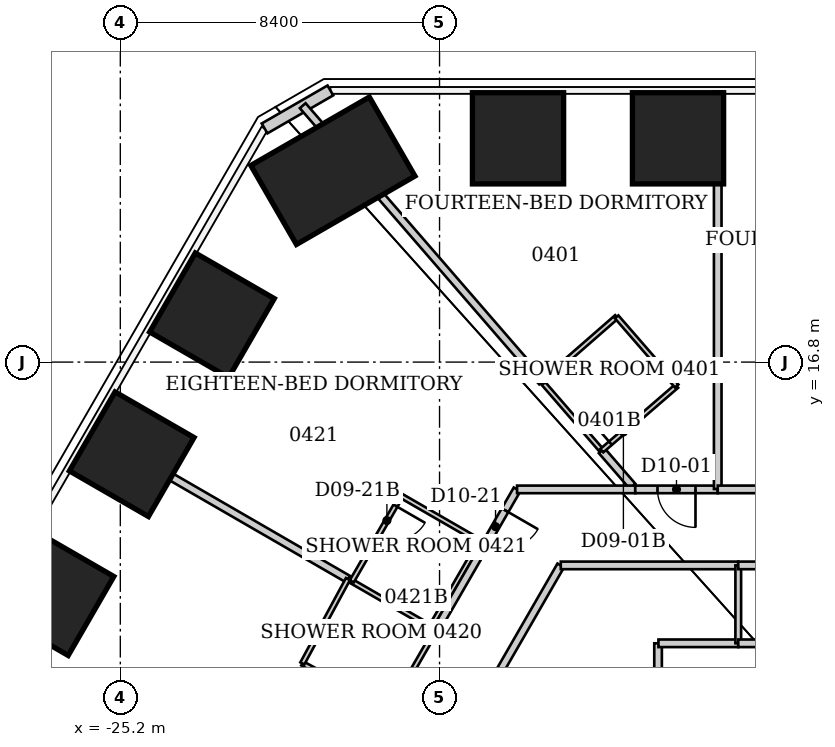
"""IFC4 building model, lengths in metres.
Left out: names, types, materials, properties, quantities, classifications, styles, units other than length and angle.
Written with IfcOpenShell. Run it as: python <this file> out.ifc"""

import sys

from ifc_helpers import new_model, si_unit, direction, frame, frame_2d, origin, origin_2d, place, context, subcontext, project, spatial, rectangle, extrude, element, fill, save


model = new_model("IFC4")
c1 = context("Model", 3, precision=1e-05, world=origin(), true_north=direction((0.0, 1.0)))
c2 = subcontext(c1, "Body", "Model", "MODEL_VIEW")
j1 = project(units=[si_unit("LENGTHUNIT", "METRE"), si_unit("PLANEANGLEUNIT", "RADIAN")], contexts=[c1])
p1 = place(None, origin())
s1 = spatial("IfcSite", under=j1, at=p1, CompositionType="ELEMENT")
p2 = place(p1, origin())
s2 = spatial("IfcBuilding", under=s1, at=p2, CompositionType="ELEMENT")
p3 = place(p2, frame((0.0, 0.0, 23.0)))
s3 = spatial("IfcBuildingStorey", under=s2, at=p3, CompositionType="ELEMENT", Elevation=23.0)
for number, where, z_axis, x_axis in (
    (1, (-14.735, 22.689, 0.0), (0.0, 0.0, 1.0), (0.0, 1.0, 0.0)),
    (2, (-10.525, 22.689, 0.0), (0.0, 0.0, 1.0), (0.0, 1.0, 0.0)),
    (3, (-27.01, 10.719, 0.0), (0.0, 0.0, 1.0), (-0.866, 0.5, 0.0)),
    (4, (-24.899, 14.375, 0.0), (0.0, 0.0, 1.0), (-0.866, 0.5, 0.0)),
    (5, (-22.788, 18.032, 0.0), (0.0, 0.0, 1.0), (-0.866, 0.5, 0.0)),
):
    element("IfcColumn", number, at=place(p3, frame(where, z_axis=z_axis, x_axis=x_axis)), inside=s3, PredefinedType="COLUMN", context=c2, shape_type="SweptSolid", body=[
        extrude(rectangle(XDim=2.4, YDim=2.4, at=origin_2d()), origin(), (0.0, 0.0, 1.0), 3.8),
    ])
p4 = place(p3, frame((-19.606, 21.835, 0.0), z_axis=(0.0, 0.0, 1.0), x_axis=(-0.5, 0.866025403784, 0.0)))
e6 = element("IfcColumn", 6, at=p4, inside=s3, PredefinedType="COLUMN", context=c2, shape_type="SweptSolid", body=[
    extrude(rectangle(XDim=2.4, YDim=3.6, at=origin_2d()), origin(), (0.0, 0.0, 1.0), 3.8),
])
p5 = place(p3, frame((-21.404, 22.949, 0.0), z_axis=(0.0, 0.0, 1.0), x_axis=(0.866010750942, 0.50002537861, 0.0)))
e7 = element("IfcWall", 7, at=p5, inside=s3, PredefinedType="SOLIDWALL", context=c2, shape_type="SweptSolid", body=[
    extrude(rectangle(XDim=2.0, YDim=0.3, at=frame_2d((1.0, 0.0))), origin(), (0.0, 0.0, 1.0), 3.64),
])
p6 = place(p3, frame((-25.886, 14.95, 0.0), z_axis=(0.0, 0.0, 1.0), x_axis=(0.865726686167, -0.50051703753, 0.0)))
e8 = element("IfcWall", 8, at=p6, inside=s3, PredefinedType="PARTITIONING", context=c2, shape_type="SweptSolid", body=[
    extrude(rectangle(XDim=7.712, YDim=0.2, at=frame_2d((3.856, 0.0))), origin(), (0.0, 0.0, 1.0), 2.86),
])
p7 = place(p3, frame((-20.41, 8.87, 0.0), z_axis=(0.0, 0.0, 1.0), x_axis=(0.879324680711, -0.476222748189, 0.0)))
e9 = element("IfcWall", 9, at=p7, inside=s3, PredefinedType="PARTITIONING", context=c2, shape_type="SweptSolid", body=[
    extrude(rectangle(XDim=2.604, YDim=0.12, at=frame_2d((1.302, 0.0))), origin(), (0.0, 0.0, 1.0), 3.64),
])
p8 = place(p7, frame((1.404, 0.0, 0.0)))
e10 = element("IfcOpeningElement", 10, at=p8, cuts=e9, PredefinedType="OPENING", context=c2, shape_type="SweptSolid", body=[
    extrude(rectangle(XDim=0.9, YDim=2.03, at=frame_2d((0.45, 1.015))), frame((0.0, 0.06, 0.0), z_axis=(0.0, -1.0, 0.0), x_axis=(1.0, 0.0, 0.0)), (0.0, 0.0, 1.0), 0.12),
])
p9 = place(p3, frame((-20.4, 23.547, 0.0), z_axis=(0.0, 0.0, 1.0), x_axis=(0.654910244559, -0.755706670323, 0.0)))
e11 = element("IfcWall", 11, at=p9, inside=s3, PredefinedType="PARTITIONING", context=c2, shape_type="SweptSolid", body=[
    extrude(rectangle(XDim=9.618, YDim=0.2, at=frame_2d((4.809, 0.0))), origin(), (0.0, 0.0, 1.0), 3.64),
])
p10 = place(p3, frame((-19.21, 11.09, 0.0), z_axis=(0.0, 0.0, 1.0), x_axis=(-0.475466449919, -0.879733854641, 0.0)))
e12 = element("IfcWall", 12, at=p10, inside=s3, PredefinedType="PARTITIONING", context=c2, shape_type="SweptSolid", body=[
    extrude(rectangle(XDim=2.524, YDim=0.12, at=frame_2d((1.262, 0.0))), origin(), (0.0, 0.0, 1.0), 3.64),
])
p11 = place(p3, frame((-19.11, 11.03, 0.0), z_axis=(0.0, 0.0, 1.0), x_axis=(0.866202511239, -0.499693115345, 0.0)))
e13 = element("IfcWall", 13, at=p11, inside=s3, PredefinedType="PARTITIONING", context=c2, shape_type="SweptSolid", body=[
    extrude(rectangle(XDim=2.401, YDim=0.12, at=frame_2d((1.201, 0.0))), origin(), (0.0, 0.0, 1.0), 2.86),
])
p12 = place(p3, frame((-18.12, 7.63, 0.0), z_axis=(0.0, 0.0, 1.0), x_axis=(0.499957770222, 0.866049783786, 0.0)))
e14 = element("IfcWall", 14, at=p12, inside=s3, PredefinedType="PARTITIONING", context=c2, shape_type="SweptSolid", body=[
    extrude(rectangle(XDim=2.455, YDim=0.12, at=frame_2d((1.228, 0.0))), origin(), (0.0, 0.0, 1.0), 3.64),
])
p13 = place(p3, frame((-17.87, 4.06, 0.0), z_axis=(0.0, 0.0, 1.0), x_axis=(0.499424260127, 0.866357552282, 0.0)))
e15 = element("IfcWall", 15, at=p13, inside=s3, PredefinedType="PARTITIONING", context=c2, shape_type="SweptSolid", body=[
    extrude(rectangle(XDim=8.53, YDim=0.2, at=frame_2d((4.265, 0.0))), origin(), (0.0, 0.0, 1.0), 3.64),
])
p14 = place(p3, frame((-17.81, 13.28, 0.0), z_axis=(0.0, 0.0, 1.0), x_axis=(-0.500291685314, -0.865856933682, 0.0)))
e16 = element("IfcWall", 16, at=p14, inside=s3, PredefinedType="PARTITIONING", context=c2, shape_type="SweptSolid", body=[
    extrude(rectangle(XDim=2.599, YDim=0.12, at=frame_2d((1.299, 0.0))), origin(), (0.0, 0.0, 1.0), 3.64),
])
p15 = place(p14, frame((0.3, 0.0, 0.0)))
e17 = element("IfcOpeningElement", 17, at=p15, cuts=e16, PredefinedType="OPENING", context=c2, shape_type="SweptSolid", body=[
    extrude(rectangle(XDim=0.9, YDim=2.03, at=frame_2d((0.45, 1.015))), frame((0.0, 0.06, 0.0), z_axis=(0.0, -1.0, 0.0), x_axis=(1.0, 0.0, 0.0)), (0.0, 0.0, 1.0), 0.12),
])
p16 = place(p3, frame((-17.03, 9.83, 0.0), z_axis=(0.0, 0.0, 1.0), x_axis=(0.880098986228, -0.47479024257, 0.0)))
e18 = element("IfcWall", 18, at=p16, inside=s3, PredefinedType="PARTITIONING", context=c2, shape_type="SweptSolid", body=[
    extrude(rectangle(XDim=0.147, YDim=0.12, at=frame_2d((0.074, 0.0))), origin(), (0.0, 0.0, 1.0), 3.64),
])
p17 = place(p3, frame((-17.03, 9.83, 0.0), z_axis=(0.0, 0.0, 1.0), x_axis=(0.500291685314, 0.865856933682, 0.0)))
e19 = element("IfcWall", 19, at=p17, inside=s3, PredefinedType="PARTITIONING", context=c2, shape_type="SweptSolid", body=[
    extrude(rectangle(XDim=2.599, YDim=0.12, at=frame_2d((1.299, 0.0))), origin(), (0.0, 0.0, 1.0), 3.64),
])
p18 = place(p3, frame((-16.892, 9.756, 0.0), z_axis=(0.0, 0.0, 1.0), x_axis=(0.499894213467, 0.866086471054, 0.0)))
e20 = element("IfcWall", 20, at=p18, inside=s3, PredefinedType="PARTITIONING", context=c2, shape_type="SweptSolid", body=[
    extrude(rectangle(XDim=4.266, YDim=0.2, at=frame_2d((2.133, 0.0))), origin(), (0.0, 0.0, 1.0), 3.64),
])
p19 = place(p18, frame((2.633, 0.0, 0.0)))
e21 = element("IfcOpeningElement", 21, at=p19, cuts=e20, PredefinedType="OPENING", context=c2, shape_type="SweptSolid", body=[
    extrude(rectangle(XDim=1.0, YDim=2.13, at=frame_2d((0.5, 1.065))), frame((0.0, 0.1, 0.0), z_axis=(0.0, -1.0, 0.0), x_axis=(1.0, 0.0, 0.0)), (0.0, 0.0, 1.0), 0.2),
])
p20 = place(p3, frame((-15.73, 12.08, 0.0), z_axis=(0.0, 0.0, 1.0), x_axis=(-0.866202511239, 0.499693115345, 0.0)))
e22 = element("IfcWall", 22, at=p20, inside=s3, PredefinedType="PARTITIONING", context=c2, shape_type="SweptSolid", body=[
    extrude(rectangle(XDim=2.401, YDim=0.12, at=frame_2d((1.201, 0.0))), origin(), (0.0, 0.0, 1.0), 3.64),
])
p21 = place(p3, frame((-14.101, 16.279, 0.0), z_axis=(0.0, 0.0, 1.0), x_axis=(0.654868469202, -0.755742871647, 0.0)))
e23 = element("IfcWall", 23, at=p21, inside=s3, PredefinedType="PARTITIONING", context=c2, shape_type="SweptSolid", body=[
    extrude(rectangle(XDim=2.396, YDim=0.12, at=frame_2d((1.198, 0.0))), origin(), (0.0, 0.0, 1.0), 3.64),
])
p22 = place(p3, frame((-13.61, 11.45, 0.0), z_axis=(0.0, 0.0, 1.0), x_axis=(1.0, 0.0, 0.0)))
e24 = element("IfcWall", 24, at=p22, inside=s3, PredefinedType="PARTITIONING", context=c2, shape_type="SweptSolid", body=[
    extrude(rectangle(XDim=4.67, YDim=0.2, at=frame_2d((2.335, 0.0))), origin(), (0.0, 0.0, 1.0), 3.64),
])
p23 = place(p3, frame((-12.532, 14.468, 0.0), z_axis=(0.0, 0.0, 1.0), x_axis=(0.654877937884, -0.755734666714, 0.0)))
e25 = element("IfcWall", 25, at=p23, inside=s3, PredefinedType="PARTITIONING", context=c2, shape_type="SweptSolid", body=[
    extrude(rectangle(XDim=1.237, YDim=0.2, at=frame_2d((0.619, 0.0))), origin(), (0.0, 0.0, 1.0), 3.64),
])
p24 = place(p3, frame((-12.53, 14.47, 0.0), z_axis=(0.0, 0.0, 1.0), x_axis=(0.757086659925, 0.653314464377, 0.0)))
e26 = element("IfcWall", 26, at=p24, inside=s3, PredefinedType="PARTITIONING", context=c2, shape_type="SweptSolid", body=[
    extrude(rectangle(XDim=2.602, YDim=0.12, at=frame_2d((1.301, 0.0))), origin(), (0.0, 0.0, 1.0), 3.64),
])
p25 = place(p24, frame((0.3, 0.0, 0.0)))
e27 = element("IfcOpeningElement", 27, at=p25, cuts=e26, PredefinedType="OPENING", context=c2, shape_type="SweptSolid", body=[
    extrude(rectangle(XDim=0.9, YDim=2.03, at=frame_2d((0.45, 1.015))), frame((0.0, 0.06, 0.0), z_axis=(0.0, -1.0, 0.0), x_axis=(1.0, 0.0, 0.0)), (0.0, 0.0, 1.0), 0.12),
])
p26 = place(p3, frame((-12.14, 17.99, 0.0), z_axis=(0.0, 0.0, 1.0), x_axis=(-0.753570046386, -0.657367617996, 0.0)))
e28 = element("IfcWall", 28, at=p26, inside=s3, PredefinedType="PARTITIONING", context=c2, shape_type="SweptSolid", body=[
    extrude(rectangle(XDim=2.601, YDim=0.12, at=frame_2d((1.301, 0.0))), origin(), (0.0, 0.0, 1.0), 3.64),
])
p27 = place(p3, frame((-11.65, 13.45, 0.0), z_axis=(0.0, 0.0, 1.0), x_axis=(-1.0, 0.0, 0.0)))
e29 = element("IfcWall", 29, at=p27, inside=s3, PredefinedType="PARTITIONING", context=c2, shape_type="SweptSolid", body=[
    extrude(rectangle(XDim=3.11, YDim=0.2, at=frame_2d((1.555, 0.0))), origin(), (0.0, 0.0, 1.0), 3.64),
])
p28 = place(p3, frame((-11.05, 9.4, 0.0), z_axis=(0.0, 0.0, 1.0), x_axis=(0.0, -1.0, 0.0)))
e30 = element("IfcWall", 30, at=p28, inside=s3, PredefinedType="PARTITIONING", context=c2, shape_type="SweptSolid", body=[
    extrude(rectangle(XDim=17.16, YDim=0.2, at=frame_2d((8.58, 0.0))), origin(), (0.0, 0.0, 1.0), 3.64),
])
p29 = place(p28, frame((8.03, 0.0, 0.0)))
e31 = element("IfcOpeningElement", 31, at=p29, cuts=e30, PredefinedType="OPENING", context=c2, shape_type="SweptSolid", body=[
    extrude(rectangle(XDim=1.1, YDim=2.2, at=frame_2d((0.55, 1.1))), frame((0.0, 0.1, 0.0), z_axis=(0.0, -1.0, 0.0), x_axis=(1.0, 0.0, 0.0)), (0.0, 0.0, 1.0), 0.2),
])
p30 = place(p3, frame((-10.56, 16.17, 0.0), z_axis=(0.0, 0.0, 1.0), x_axis=(-0.65550883331, 0.755187506155, 0.0)))
e32 = element("IfcWall", 32, at=p30, inside=s3, PredefinedType="PARTITIONING", context=c2, shape_type="SweptSolid", body=[
    extrude(rectangle(XDim=2.41, YDim=0.12, at=frame_2d((1.205, 0.0))), origin(), (0.0, 0.0, 1.0), 3.64),
])
p31 = place(p3, frame((-9.48, 13.45, 0.0), z_axis=(0.0, 0.0, 1.0), x_axis=(-1.0, 0.0, 0.0)))
e33 = element("IfcWall", 33, at=p31, inside=s3, PredefinedType="PARTITIONING", context=c2, shape_type="SweptSolid", body=[
    extrude(rectangle(XDim=2.17, YDim=0.2, at=frame_2d((1.085, 0.0))), origin(), (0.0, 0.0, 1.0), 3.64),
])
p32 = place(p31, frame((0.585, 0.0, 0.0)))
e34 = element("IfcOpeningElement", 34, at=p32, cuts=e33, PredefinedType="OPENING", context=c2, shape_type="SweptSolid", body=[
    extrude(rectangle(XDim=1.0, YDim=2.13, at=frame_2d((0.5, 1.065))), frame((0.0, 0.1, 0.0), z_axis=(0.0, -1.0, 0.0), x_axis=(1.0, 0.0, 0.0)), (0.0, 0.0, 1.0), 0.2),
])
p33 = place(p3, frame((-9.48, 23.92, 0.0), z_axis=(0.0, 0.0, 1.0), x_axis=(0.0, -1.0, 0.0)))
e35 = element("IfcWall", 35, at=p33, inside=s3, PredefinedType="PARTITIONING", context=c2, shape_type="SweptSolid", body=[
    extrude(rectangle(XDim=10.46, YDim=0.2, at=frame_2d((5.23, 0.0))), origin(), (0.0, 0.0, 1.0), 3.64),
])
p34 = place(p3, frame((-8.94, 9.4, 0.0), z_axis=(0.0, 0.0, 1.0), x_axis=(-1.0, 0.0, 0.0)))
e36 = element("IfcWall", 36, at=p34, inside=s3, PredefinedType="PARTITIONING", context=c2, shape_type="SweptSolid", body=[
    extrude(rectangle(XDim=2.1, YDim=0.2, at=frame_2d((1.05, 0.0))), origin(), (0.0, 0.0, 1.0), 3.64),
])
p35 = place(p3, frame((-8.94, 11.45, 0.0), z_axis=(0.0, 0.0, 1.0), x_axis=(0.0, -1.0, 0.0)))
e37 = element("IfcWall", 37, at=p35, inside=s3, PredefinedType="PARTITIONING", context=c2, shape_type="SweptSolid", body=[
    extrude(rectangle(XDim=2.05, YDim=0.15, at=frame_2d((1.025, 0.0))), origin(), (0.0, 0.0, 1.0), 3.64),
])
p36 = place(p3, frame((-8.94, 11.45, 0.0), z_axis=(0.0, 0.0, 1.0), x_axis=(1.0, 0.0, 0.0)))
e38 = element("IfcWall", 38, at=p36, inside=s3, PredefinedType="PARTITIONING", context=c2, shape_type="SweptSolid", body=[
    extrude(rectangle(XDim=8.94, YDim=0.2, at=frame_2d((4.47, 0.0))), origin(), (0.0, 0.0, 1.0), 3.64),
])
p37 = place(p36, frame((3.92, 0.0, 0.0)))
e39 = element("IfcOpeningElement", 39, at=p37, cuts=e38, PredefinedType="OPENING", context=c2, shape_type="SweptSolid", body=[
    extrude(rectangle(XDim=1.1, YDim=2.2, at=frame_2d((0.55, 1.1))), frame((0.0, 0.1, 0.0), z_axis=(0.0, -1.0, 0.0), x_axis=(1.0, 0.0, 0.0)), (0.0, 0.0, 1.0), 0.2),
])
p38 = place(p3, frame((-4.64, 13.45, 0.0), z_axis=(0.0, 0.0, 1.0), x_axis=(-1.0, 0.0, 0.0)))
e40 = element("IfcWall", 40, at=p38, inside=s3, PredefinedType="PARTITIONING", context=c2, shape_type="SweptSolid", body=[
    extrude(rectangle(XDim=4.84, YDim=0.2, at=frame_2d((2.42, 0.0))), origin(), (0.0, 0.0, 1.0), 3.64),
])
p39 = place(p38, frame((1.92, 0.0, 0.0)))
e41 = element("IfcOpeningElement", 41, at=p39, cuts=e40, PredefinedType="OPENING", context=c2, shape_type="SweptSolid", body=[
    extrude(rectangle(XDim=1.0, YDim=2.13, at=frame_2d((0.5, 1.065))), frame((0.0, 0.1, 0.0), z_axis=(0.0, -1.0, 0.0), x_axis=(1.0, 0.0, 0.0)), (0.0, 0.0, 1.0), 0.2),
])
p40 = place(p3, frame((0.0, 9.4, 0.0), z_axis=(0.0, 0.0, 1.0), x_axis=(-1.0, 0.0, 0.0)))
e42 = element("IfcWall", 42, at=p40, inside=s3, PredefinedType="PARTITIONING", context=c2, shape_type="SweptSolid", body=[
    extrude(rectangle(XDim=8.94, YDim=0.2, at=frame_2d((4.47, 0.0))), origin(), (0.0, 0.0, 1.0), 3.64),
])
p41 = place(p32, origin())
e43 = element("IfcDoor", 43, at=p41, inside=s3, OperationType="SINGLE_SWING_LEFT", PredefinedType="DOOR", context=c2, shape_type="SweptSolid", body=[
    extrude(rectangle(XDim=1.0, YDim=2.13, at=frame_2d((0.5, 1.065))), frame((0.0, 0.025, 0.0), z_axis=(0.0, -1.0, 0.0), x_axis=(1.0, 0.0, 0.0)), (0.0, 0.0, 1.0), 0.05),
])
fill(e34, e43)
p42 = place(p25, origin())
e44 = element("IfcDoor", 44, at=p42, inside=s3, OperationType="SINGLE_SWING_LEFT", PredefinedType="DOOR", context=c2, shape_type="SweptSolid", body=[
    extrude(rectangle(XDim=0.9, YDim=2.03, at=frame_2d((0.45, 1.015))), frame((0.0, 0.025, 0.0), z_axis=(0.0, -1.0, 0.0), x_axis=(1.0, 0.0, 0.0)), (0.0, 0.0, 1.0), 0.05),
])
fill(e27, e44)
p43 = place(p19, origin())
e45 = element("IfcDoor", 45, at=p43, inside=s3, OperationType="SINGLE_SWING_RIGHT", PredefinedType="DOOR", context=c2, shape_type="SweptSolid", body=[
    extrude(rectangle(XDim=1.0, YDim=2.13, at=frame_2d((0.5, 1.065))), frame((0.0, 0.025, 0.0), z_axis=(0.0, -1.0, 0.0), x_axis=(1.0, 0.0, 0.0)), (0.0, 0.0, 1.0), 0.05),
])
fill(e21, e45)
p44 = place(p15, origin())
e46 = element("IfcDoor", 46, at=p44, inside=s3, OperationType="SINGLE_SWING_LEFT", PredefinedType="DOOR", context=c2, shape_type="SweptSolid", body=[
    extrude(rectangle(XDim=0.9, YDim=2.03, at=frame_2d((0.45, 1.015))), frame((0.0, 0.025, 0.0), z_axis=(0.0, -1.0, 0.0), x_axis=(1.0, 0.0, 0.0)), (0.0, 0.0, 1.0), 0.05),
])
fill(e17, e46)
save(model, sys.argv[1])
